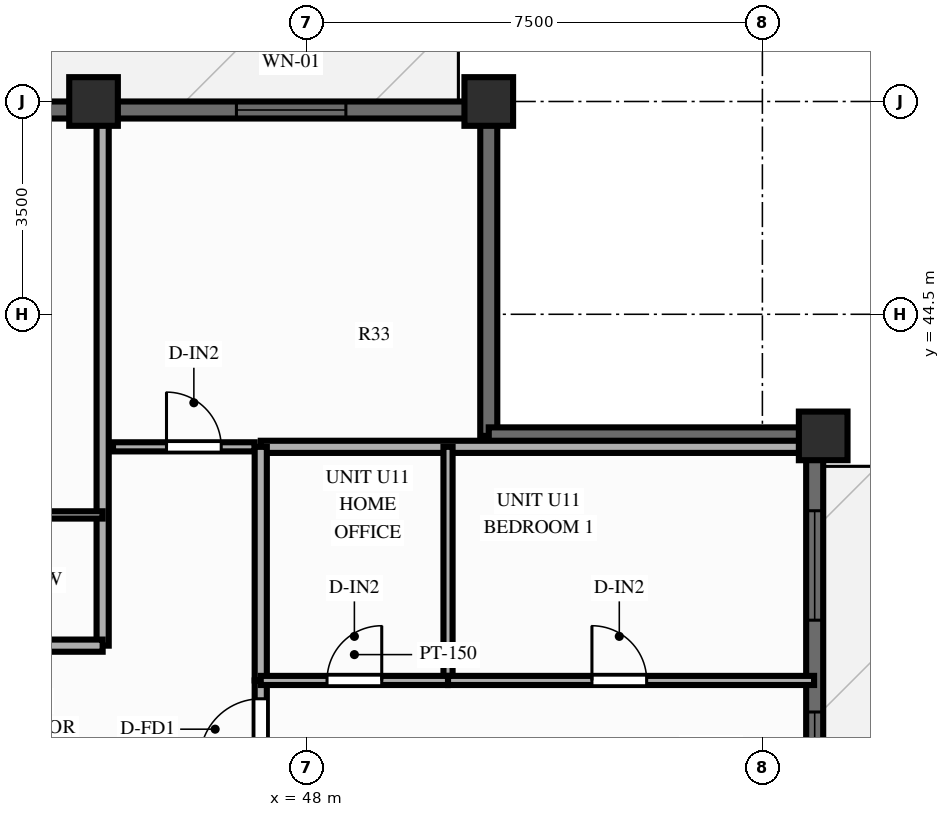
"""IFC4 building model, lengths in metres.
Left out: names, types, materials, properties, quantities, classifications, styles, units other than length and angle.
Written with IfcOpenShell. Run it as: python <this file> out.ifc"""

import sys

from ifc_helpers import new_model, si_unit, direction, frame, frame_2d, origin, origin_2d, place, context, subcontext, project, spatial, rectangle, extrude, source, transform, mapped, element, fill, save


model = new_model("IFC4")
c1 = context("Model", 3, precision=1e-05, world=origin(), true_north=direction((0.0, 1.0)))
c2 = subcontext(c1, "Body", "Model", "MODEL_VIEW")
j1 = project(units=[si_unit("LENGTHUNIT", "METRE"), si_unit("PLANEANGLEUNIT", "RADIAN")], contexts=[c1])
p1 = place(None, origin())
s1 = spatial("IfcSite", under=j1, at=p1, CompositionType="ELEMENT")
p2 = place(p1, origin())
s2 = spatial("IfcBuilding", under=s1, at=p2, CompositionType="ELEMENT")
p3 = place(p2, frame((0.0, 0.0, 202.6)))
s3 = spatial("IfcBuildingStorey", under=s2, at=p3, CompositionType="ELEMENT", Elevation=202.6)
m1 = source(origin(), c2, "Body", "SweptSolid", [
    extrude(rectangle(XDim=0.8, YDim=0.8, at=origin_2d()), origin(), (0.0, 0.0, 1.0), 3.9),
])
for number, where, z_axis, x_axis in (
    (1, (56.5, 42.5, 0.0), (0.0, 0.0, 1.0), (1.0, 0.0, 0.0)),
    (2, (51.0, 48.0, 0.0), (0.0, 0.0, 1.0), (1.0, 0.0, 0.0)),
    (3, (44.5, 48.0, 0.0), (0.0, 0.0, 1.0), (1.0, 0.0, 0.0)),
):
    element("IfcColumn", number, at=place(p3, frame(where, z_axis=z_axis, x_axis=x_axis)), inside=s3, PredefinedType="COLUMN", context=c2, shape_type="MappedRepresentation", body=[
        mapped(m1, transform((0.0, 0.0, 0.0), scale=1.0)),
    ])
p4 = place(p3, frame((25.0, 47.86, 0.0), z_axis=(0.0, 0.0, 1.0), x_axis=(1.0, 0.0, 0.0)))
e4 = element("IfcWall", 4, at=p4, inside=s3, PredefinedType="SOLIDWALL", context=c2, shape_type="SweptSolid", body=[
    extrude(rectangle(XDim=26.0, YDim=0.28, at=frame_2d((13.0, 0.0))), origin(), (0.0, 0.0, 1.0), 2.79),
])
p5 = place(p4, frame((2.7, 0.0, 0.0)))
e5 = element("IfcOpeningElement", 5, at=p5, cuts=e4, PredefinedType="OPENING", context=c2, shape_type="SweptSolid", body=[
    extrude(rectangle(XDim=1.1, YDim=2.15, at=frame_2d((0.55, 1.075))), frame((0.0, 0.152, 0.0), z_axis=(0.0, -1.0, 0.0), x_axis=(1.0, 0.0, 0.0)), (0.0, 0.0, 1.0), 0.304),
])
p6 = place(p4, frame((7.145, 0.0, 0.85)))
e6 = element("IfcOpeningElement", 6, at=p6, cuts=e4, PredefinedType="OPENING", context=c2, shape_type="SweptSolid", body=[
    extrude(rectangle(XDim=0.95, YDim=1.5, at=frame_2d((0.475, 0.75))), frame((0.0, 0.152, 0.0), z_axis=(0.0, -1.0, 0.0), x_axis=(1.0, 0.0, 0.0)), (0.0, 0.0, 1.0), 0.304),
])
p7 = place(p4, frame((9.032, 0.0, 0.85)))
e7 = element("IfcOpeningElement", 7, at=p7, cuts=e4, PredefinedType="OPENING", context=c2, shape_type="SweptSolid", body=[
    extrude(rectangle(XDim=1.5, YDim=1.65, at=frame_2d((0.75, 0.825))), frame((0.0, 0.152, 0.0), z_axis=(0.0, -1.0, 0.0), x_axis=(1.0, 0.0, 0.0)), (0.0, 0.0, 1.0), 0.304),
])
p8 = place(p4, frame((11.67, 0.0, 0.85)))
e8 = element("IfcOpeningElement", 8, at=p8, cuts=e4, PredefinedType="OPENING", context=c2, shape_type="SweptSolid", body=[
    extrude(rectangle(XDim=1.8, YDim=1.65, at=frame_2d((0.9, 0.825))), frame((0.0, 0.152, 0.0), z_axis=(0.0, -1.0, 0.0), x_axis=(1.0, 0.0, 0.0)), (0.0, 0.0, 1.0), 0.304),
])
p9 = place(p4, frame((14.68, 0.0, 0.85)))
e9 = element("IfcOpeningElement", 9, at=p9, cuts=e4, PredefinedType="OPENING", context=c2, shape_type="SweptSolid", body=[
    extrude(rectangle(XDim=1.8, YDim=1.65, at=frame_2d((0.9, 0.825))), frame((0.0, 0.152, 0.0), z_axis=(0.0, -1.0, 0.0), x_axis=(1.0, 0.0, 0.0)), (0.0, 0.0, 1.0), 0.304),
])
p10 = place(p4, frame((17.573, 0.0, 0.85)))
e10 = element("IfcOpeningElement", 10, at=p10, cuts=e4, PredefinedType="OPENING", context=c2, shape_type="SweptSolid", body=[
    extrude(rectangle(XDim=1.2, YDim=1.5, at=frame_2d((0.6, 0.75))), frame((0.0, 0.152, 0.0), z_axis=(0.0, -1.0, 0.0), x_axis=(1.0, 0.0, 0.0)), (0.0, 0.0, 1.0), 0.304),
])
p11 = place(p4, frame((21.85, 0.0, 0.85)))
e11 = element("IfcOpeningElement", 11, at=p11, cuts=e4, PredefinedType="OPENING", context=c2, shape_type="SweptSolid", body=[
    extrude(rectangle(XDim=1.8, YDim=1.65, at=frame_2d((0.9, 0.825))), frame((0.0, 0.152, 0.0), z_axis=(0.0, -1.0, 0.0), x_axis=(1.0, 0.0, 0.0)), (0.0, 0.0, 1.0), 0.304),
])
p12 = place(p3, frame((56.36, 11.5, 0.0), z_axis=(0.0, 0.0, 1.0), x_axis=(0.0, 1.0, 0.0)))
e12 = element("IfcWall", 12, at=p12, inside=s3, PredefinedType="SOLIDWALL", context=c2, shape_type="SweptSolid", body=[
    extrude(rectangle(XDim=31.0, YDim=0.28, at=frame_2d((15.5, 0.0))), origin(), (0.0, 0.0, 1.0), 2.79),
])
p13 = place(p12, frame((0.685, 0.0, 0.85)))
e13 = element("IfcOpeningElement", 13, at=p13, cuts=e12, PredefinedType="OPENING", context=c2, shape_type="SweptSolid", body=[
    extrude(rectangle(XDim=1.8, YDim=1.65, at=frame_2d((0.9, 0.825))), frame((0.0, 0.152, 0.0), z_axis=(0.0, -1.0, 0.0), x_axis=(1.0, 0.0, 0.0)), (0.0, 0.0, 1.0), 0.304),
])
p14 = place(p12, frame((3.695, 0.0, 0.85)))
e14 = element("IfcOpeningElement", 14, at=p14, cuts=e12, PredefinedType="OPENING", context=c2, shape_type="SweptSolid", body=[
    extrude(rectangle(XDim=1.8, YDim=1.65, at=frame_2d((0.9, 0.825))), frame((0.0, 0.152, 0.0), z_axis=(0.0, -1.0, 0.0), x_axis=(1.0, 0.0, 0.0)), (0.0, 0.0, 1.0), 0.304),
])
p15 = place(p12, frame((7.789, 0.0, 0.85)))
e15 = element("IfcOpeningElement", 15, at=p15, cuts=e12, PredefinedType="OPENING", context=c2, shape_type="SweptSolid", body=[
    extrude(rectangle(XDim=1.8, YDim=1.65, at=frame_2d((0.9, 0.825))), frame((0.0, 0.152, 0.0), z_axis=(0.0, -1.0, 0.0), x_axis=(1.0, 0.0, 0.0)), (0.0, 0.0, 1.0), 0.304),
])
p16 = place(p12, frame((11.073, 0.0, 0.85)))
e16 = element("IfcOpeningElement", 16, at=p16, cuts=e12, PredefinedType="OPENING", context=c2, shape_type="SweptSolid", body=[
    extrude(rectangle(XDim=1.8, YDim=1.65, at=frame_2d((0.9, 0.825))), frame((0.0, 0.152, 0.0), z_axis=(0.0, -1.0, 0.0), x_axis=(1.0, 0.0, 0.0)), (0.0, 0.0, 1.0), 0.304),
])
p17 = place(p12, frame((15.907, 0.0, 0.0), z_axis=(0.0, 0.0, 1.0), x_axis=(-1.0, 0.0, 0.0)))
e17 = element("IfcOpeningElement", 17, at=p17, cuts=e12, PredefinedType="OPENING", context=c2, shape_type="SweptSolid", body=[
    extrude(rectangle(XDim=1.6, YDim=2.15, at=frame_2d((0.8, 1.075))), frame((0.0, 0.152, 0.0), z_axis=(0.0, -1.0, 0.0), x_axis=(1.0, 0.0, 0.0)), (0.0, 0.0, 1.0), 0.304),
])
p18 = place(p12, frame((17.888, 0.0, 0.85)))
e18 = element("IfcOpeningElement", 18, at=p18, cuts=e12, PredefinedType="OPENING", context=c2, shape_type="SweptSolid", body=[
    extrude(rectangle(XDim=1.8, YDim=1.65, at=frame_2d((0.9, 0.825))), frame((0.0, 0.152, 0.0), z_axis=(0.0, -1.0, 0.0), x_axis=(1.0, 0.0, 0.0)), (0.0, 0.0, 1.0), 0.304),
])
p19 = place(p12, frame((21.184, 0.0, 0.85)))
e19 = element("IfcOpeningElement", 19, at=p19, cuts=e12, PredefinedType="OPENING", context=c2, shape_type="SweptSolid", body=[
    extrude(rectangle(XDim=1.8, YDim=1.65, at=frame_2d((0.9, 0.825))), frame((0.0, 0.152, 0.0), z_axis=(0.0, -1.0, 0.0), x_axis=(1.0, 0.0, 0.0)), (0.0, 0.0, 1.0), 0.304),
])
p20 = place(p12, frame((25.259, 0.0, 0.85)))
e20 = element("IfcOpeningElement", 20, at=p20, cuts=e12, PredefinedType="OPENING", context=c2, shape_type="SweptSolid", body=[
    extrude(rectangle(XDim=1.2, YDim=1.5, at=frame_2d((0.6, 0.75))), frame((0.0, 0.152, 0.0), z_axis=(0.0, -1.0, 0.0), x_axis=(1.0, 0.0, 0.0)), (0.0, 0.0, 1.0), 0.304),
])
p21 = place(p12, frame((27.969, 0.0, 0.85)))
e21 = element("IfcOpeningElement", 21, at=p21, cuts=e12, PredefinedType="OPENING", context=c2, shape_type="SweptSolid", body=[
    extrude(rectangle(XDim=1.8, YDim=1.65, at=frame_2d((0.9, 0.825))), frame((0.0, 0.152, 0.0), z_axis=(0.0, -1.0, 0.0), x_axis=(1.0, 0.0, 0.0)), (0.0, 0.0, 1.0), 0.304),
])
for number, where, z_axis, x_axis in (
    (22, (51.0, 42.5, 0.0), (0.0, 0.0, 1.0), (0.0, 1.0, 0.0)),
    (23, (51.0, 42.5, 0.0), (0.0, 0.0, 1.0), (1.0, 0.0, 0.0)),
):
    element("IfcWall", number, at=place(p3, frame(where, z_axis=z_axis, x_axis=x_axis)), inside=s3, PredefinedType="SOLIDWALL", context=c2, shape_type="SweptSolid", body=[
        extrude(rectangle(XDim=5.42, YDim=0.28, at=frame_2d((2.71, 0.0))), origin(), (0.0, 0.0, 1.0), 2.79),
    ])
p22 = place(p3, frame((44.82, 42.32, 0.0), z_axis=(0.0, 0.0, 1.0), x_axis=(1.0, 0.0, 0.0)))
e24 = element("IfcWall", 24, at=p22, inside=s3, PredefinedType="PARTITIONING", context=c2, shape_type="SweptSolid", body=[
    extrude(rectangle(XDim=2.33, YDim=0.15, at=frame_2d((1.165, 0.0))), origin(), (0.0, 0.0, 1.0), 3.6),
])
p23 = place(p22, frame((0.88, 0.0, 0.0)))
e25 = element("IfcOpeningElement", 25, at=p23, cuts=e24, PredefinedType="OPENING", context=c2, shape_type="SweptSolid", body=[
    extrude(rectangle(XDim=0.9, YDim=2.1, at=frame_2d((0.45, 1.05))), frame((0.0, 0.087, 0.0), z_axis=(0.0, -1.0, 0.0), x_axis=(1.0, 0.0, 0.0)), (0.0, 0.0, 1.0), 0.174),
])
p24 = place(p3, frame((44.65, 39.05, 0.0), z_axis=(0.0, 0.0, 1.0), x_axis=(0.0, 1.0, 0.0)))
e26 = element("IfcWall", 26, at=p24, inside=s3, PredefinedType="PARTITIONING", context=c2, shape_type="SweptSolid", body=[
    extrude(rectangle(XDim=8.8, YDim=0.2, at=frame_2d((4.4, 0.0))), origin(), (0.0, 0.0, 1.0), 2.79),
])
p25 = place(p3, frame((42.085, 39.05, 0.0), z_axis=(0.0, 0.0, 1.0), x_axis=(1.0, 0.0, 0.0)))
e27 = element("IfcWall", 27, at=p25, inside=s3, PredefinedType="PARTITIONING", context=c2, shape_type="SweptSolid", body=[
    extrude(rectangle(XDim=2.564, YDim=0.2, at=frame_2d((1.282, 0.0))), origin(), (0.0, 0.0, 1.0), 3.6),
])
p26 = place(p3, frame((42.085, 41.2, 0.0), z_axis=(0.0, 0.0, 1.0), x_axis=(1.0, 0.0, 0.0)))
e28 = element("IfcWall", 28, at=p26, inside=s3, PredefinedType="PARTITIONING", context=c2, shape_type="SweptSolid", body=[
    extrude(rectangle(XDim=2.564, YDim=0.12, at=frame_2d((1.282, 0.0))), origin(), (0.0, 0.0, 1.0), 3.6),
])
p27 = place(p3, frame((47.25, 42.32, 0.0), z_axis=(0.0, 0.0, 1.0), x_axis=(1.0, 0.0, 0.0)))
e29 = element("IfcWall", 29, at=p27, inside=s3, PredefinedType="PARTITIONING", context=c2, shape_type="SweptSolid", body=[
    extrude(rectangle(XDim=9.1, YDim=0.2, at=frame_2d((4.55, 0.0))), origin(), (0.0, 0.0, 1.0), 3.6),
])
p28 = place(p3, frame((47.25, 34.959, 0.0), z_axis=(0.0, 0.0, 1.0), x_axis=(0.0, 1.0, 0.0)))
e30 = element("IfcWall", 30, at=p28, inside=s3, PredefinedType="PARTITIONING", context=c2, shape_type="SweptSolid", body=[
    extrude(rectangle(XDim=3.519, YDim=0.2, at=frame_2d((1.76, 0.0))), origin(), (0.0, 0.0, 1.0), 3.6),
])
p29 = place(p28, frame((2.217, 0.0, 0.0)))
e31 = element("IfcOpeningElement", 31, at=p29, cuts=e30, PredefinedType="OPENING", context=c2, shape_type="SweptSolid", body=[
    extrude(rectangle(XDim=1.0, YDim=2.15, at=frame_2d((0.5, 1.075))), frame((0.0, 0.112, 0.0), z_axis=(0.0, -1.0, 0.0), x_axis=(1.0, 0.0, 0.0)), (0.0, 0.0, 1.0), 0.224),
])
p30 = place(p3, frame((47.25, 38.478, 0.0), z_axis=(0.0, 0.0, 1.0), x_axis=(0.0, 1.0, 0.0)))
e32 = element("IfcWall", 32, at=p30, inside=s3, PredefinedType="PARTITIONING", context=c2, shape_type="SweptSolid", body=[
    extrude(rectangle(XDim=3.842, YDim=0.2, at=frame_2d((1.921, 0.0))), origin(), (0.0, 0.0, 1.0), 3.6),
])
p31 = place(p3, frame((50.33, 38.478, 0.0), z_axis=(0.0, 0.0, 1.0), x_axis=(0.0, 1.0, 0.0)))
e33 = element("IfcWall", 33, at=p31, inside=s3, PredefinedType="PARTITIONING", context=c2, shape_type="SweptSolid", body=[
    extrude(rectangle(XDim=3.842, YDim=0.15, at=frame_2d((1.921, 0.0))), origin(), (0.0, 0.0, 1.0), 3.6),
])
p32 = place(p3, frame((47.25, 38.478, 0.0), z_axis=(0.0, 0.0, 1.0), x_axis=(1.0, 0.0, 0.0)))
e34 = element("IfcWall", 34, at=p32, inside=s3, PredefinedType="PARTITIONING", context=c2, shape_type="SweptSolid", body=[
    extrude(rectangle(XDim=3.08, YDim=0.15, at=frame_2d((1.54, 0.0))), origin(), (0.0, 0.0, 1.0), 3.6),
])
p33 = place(p32, frame((1.09, 0.0, 0.0)))
e35 = element("IfcOpeningElement", 35, at=p33, cuts=e34, PredefinedType="OPENING", context=c2, shape_type="SweptSolid", body=[
    extrude(rectangle(XDim=0.9, YDim=2.1, at=frame_2d((0.45, 1.05))), frame((0.0, 0.087, 0.0), z_axis=(0.0, -1.0, 0.0), x_axis=(1.0, 0.0, 0.0)), (0.0, 0.0, 1.0), 0.174),
])
p34 = place(p3, frame((50.33, 38.478, 0.0), z_axis=(0.0, 0.0, 1.0), x_axis=(1.0, 0.0, 0.0)))
e36 = element("IfcWall", 36, at=p34, inside=s3, PredefinedType="PARTITIONING", context=c2, shape_type="SweptSolid", body=[
    extrude(rectangle(XDim=6.02, YDim=0.15, at=frame_2d((3.01, 0.0))), origin(), (0.0, 0.0, 1.0), 3.6),
])
p35 = place(p34, frame((2.367, 0.0, 0.0)))
e37 = element("IfcOpeningElement", 37, at=p35, cuts=e36, PredefinedType="OPENING", context=c2, shape_type="SweptSolid", body=[
    extrude(rectangle(XDim=0.9, YDim=2.1, at=frame_2d((0.45, 1.05))), frame((0.0, 0.087, 0.0), z_axis=(0.0, -1.0, 0.0), x_axis=(1.0, 0.0, 0.0)), (0.0, 0.0, 1.0), 0.174),
])
m2 = source(origin(), c2, "Body", "SweptSolid", [
    extrude(rectangle(XDim=1.8, YDim=1.65, at=frame_2d((0.9, 0.825))), frame((0.0, 0.03, 0.0), z_axis=(0.0, -1.0, 0.0), x_axis=(1.0, 0.0, 0.0)), (0.0, 0.0, 1.0), 0.06),
])
p36 = place(p11, origin())
e38 = element("IfcWindow", 38, at=p36, inside=s3, PartitioningType="SINGLE_PANEL", PredefinedType="WINDOW", context=c2, shape_type="MappedRepresentation", body=[
    mapped(m2, transform((0.0, 0.0, 0.0), scale=1.0)),
])
fill(e11, e38)
m3 = source(origin(), c2, "Body", "SweptSolid", [
    extrude(rectangle(XDim=1.2, YDim=1.5, at=frame_2d((0.6, 0.75))), frame((0.0, 0.03, 0.0), z_axis=(0.0, -1.0, 0.0), x_axis=(1.0, 0.0, 0.0)), (0.0, 0.0, 1.0), 0.06),
])
p37 = place(p20, origin())
e39 = element("IfcWindow", 39, at=p37, inside=s3, PartitioningType="SINGLE_PANEL", PredefinedType="WINDOW", context=c2, shape_type="MappedRepresentation", body=[
    mapped(m3, transform((0.0, 0.0, 0.0), scale=1.0)),
])
fill(e20, e39)
p38 = place(p21, origin())
e40 = element("IfcWindow", 40, at=p38, inside=s3, PartitioningType="SINGLE_PANEL", PredefinedType="WINDOW", context=c2, shape_type="MappedRepresentation", body=[
    mapped(m2, transform((0.0, 0.0, 0.0), scale=1.0)),
])
fill(e21, e40)
m4 = source(origin(), c2, "Body", "SweptSolid", [
    extrude(rectangle(XDim=0.9, YDim=2.1, at=frame_2d((0.45, 1.05))), frame((0.0, 0.025, 0.0), z_axis=(0.0, -1.0, 0.0), x_axis=(1.0, 0.0, 0.0)), (0.0, 0.0, 1.0), 0.05),
])
p39 = place(p23, origin())
e41 = element("IfcDoor", 41, at=p39, inside=s3, OperationType="SINGLE_SWING_LEFT", PredefinedType="DOOR", context=c2, shape_type="MappedRepresentation", body=[
    mapped(m4, transform((0.0, 0.0, 0.0), scale=1.0)),
])
fill(e25, e41)
m5 = source(origin(), c2, "Body", "SweptSolid", [
    extrude(rectangle(XDim=1.0, YDim=2.15, at=frame_2d((0.5, 1.075))), frame((0.0, 0.025, 0.0), z_axis=(0.0, -1.0, 0.0), x_axis=(1.0, 0.0, 0.0)), (0.0, 0.0, 1.0), 0.05),
])
p40 = place(p29, origin())
e42 = element("IfcDoor", 42, at=p40, inside=s3, OperationType="SINGLE_SWING_LEFT", PredefinedType="DOOR", context=c2, shape_type="MappedRepresentation", body=[
    mapped(m5, transform((0.0, 0.0, 0.0), scale=1.0)),
])
fill(e31, e42)
p41 = place(p33, origin())
e43 = element("IfcDoor", 43, at=p41, inside=s3, OperationType="SINGLE_SWING_RIGHT", PredefinedType="DOOR", context=c2, shape_type="MappedRepresentation", body=[
    mapped(m4, transform((0.0, 0.0, 0.0), scale=1.0)),
])
fill(e35, e43)
p42 = place(p35, origin())
e44 = element("IfcDoor", 44, at=p42, inside=s3, OperationType="SINGLE_SWING_LEFT", PredefinedType="DOOR", context=c2, shape_type="MappedRepresentation", body=[
    mapped(m4, transform((0.0, 0.0, 0.0), scale=1.0)),
])
fill(e37, e44)
save(model, sys.argv[1])
